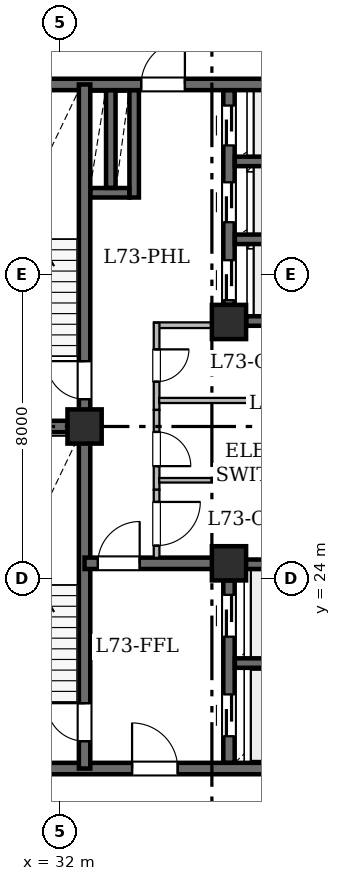
"""IFC4 building model, lengths in metres.
Left out: names, types, materials, properties, quantities, classifications, styles, units other than length and angle.
Written with IfcOpenShell. Run it as: python <this file> out.ifc"""

import sys

from ifc_helpers import new_model, si_unit, direction, frame, frame_2d, origin, origin_2d, place, context, subcontext, project, spatial, rectangle, hollow_rectangle, extrude, element, fill, save


model = new_model("IFC4")
c1 = context("Model", 3, precision=1e-05, world=origin(), true_north=direction((0.0, 1.0)))
c2 = subcontext(c1, "Body", "Model", "MODEL_VIEW")
j1 = project(units=[si_unit("LENGTHUNIT", "METRE"), si_unit("PLANEANGLEUNIT", "RADIAN")], contexts=[c1])
p1 = place(None, origin())
s1 = spatial("IfcSite", under=j1, at=p1, CompositionType="ELEMENT")
p2 = place(p1, origin())
s2 = spatial("IfcBuilding", under=s1, at=p2, CompositionType="ELEMENT")
p3 = place(p2, frame((0.0, 0.0, 286.25)))
s3 = spatial("IfcBuildingStorey", under=s2, at=p3, CompositionType="ELEMENT", Elevation=286.25)
for number, where, z_axis, x_axis in (
    (1, (32.65, 28.0, 0.0), (0.0, 0.0, 1.0), (1.0, 0.0, 0.0)),
    (2, (36.45, 24.4, 0.0), (0.0, 0.0, 1.0), (1.0, 0.0, 0.0)),
    (3, (36.45, 30.75, 0.0), (0.0, 0.0, 1.0), (1.0, 0.0, 0.0)),
):
    element("IfcColumn", number, at=place(p3, frame(where, z_axis=z_axis, x_axis=x_axis)), inside=s3, PredefinedType="COLUMN", context=c2, shape_type="SweptSolid", body=[
        extrude(hollow_rectangle(XDim=0.9, YDim=0.9, WallThickness=0.045, at=origin_2d()), origin(), (0.0, 0.0, 1.0), 4.2),
    ])
p4 = place(p3, frame((29.0, 19.0, 0.0), z_axis=(0.0, 0.0, 1.0), x_axis=(1.0, 0.0, 0.0)))
e4 = element("IfcWall", 4, at=p4, inside=s3, PredefinedType="SHEAR", context=c2, shape_type="SweptSolid", body=[
    extrude(rectangle(XDim=10.4, YDim=0.3, at=frame_2d((5.2, 0.0))), origin(), (0.0, 0.0, 1.0), 3.95),
])
p5 = place(p4, frame((4.9, 0.0, 0.0)))
e5 = element("IfcOpeningElement", 5, at=p5, cuts=e4, PredefinedType="OPENING", context=c2, shape_type="SweptSolid", body=[
    extrude(rectangle(XDim=1.2, YDim=2.15, at=frame_2d((0.6, 1.075))), frame((0.0, 0.16, 0.0), z_axis=(0.0, -1.0, 0.0), x_axis=(1.0, 0.0, 0.0)), (0.0, 0.0, 1.0), 0.32),
])
p6 = place(p3, frame((29.0, 37.0, 0.0), z_axis=(0.0, 0.0, 1.0), x_axis=(1.0, 0.0, 0.0)))
e6 = element("IfcWall", 6, at=p6, inside=s3, PredefinedType="SHEAR", context=c2, shape_type="SweptSolid", body=[
    extrude(rectangle(XDim=10.4, YDim=0.3, at=frame_2d((5.2, 0.0))), origin(), (0.0, 0.0, 1.0), 3.95),
])
p7 = place(p6, frame((5.14, 0.0, 0.0)))
e7 = element("IfcOpeningElement", 7, at=p7, cuts=e6, PredefinedType="OPENING", context=c2, shape_type="SweptSolid", body=[
    extrude(rectangle(XDim=1.15, YDim=2.2, at=frame_2d((0.575, 1.1))), frame((0.0, 0.16, 0.0), z_axis=(0.0, -1.0, 0.0), x_axis=(1.0, 0.0, 0.0)), (0.0, 0.0, 1.0), 0.32),
])
p8 = place(p3, frame((32.65, 19.0, 0.0), z_axis=(0.0, 0.0, 1.0), x_axis=(0.0, 1.0, 0.0)))
e8 = element("IfcWall", 8, at=p8, inside=s3, PredefinedType="SHEAR", context=c2, shape_type="SweptSolid", body=[
    extrude(rectangle(XDim=9.0, YDim=0.3, at=frame_2d((4.5, 0.0))), origin(), (0.0, 0.0, 1.0), 3.95),
])
p9 = place(p8, frame((0.72, 0.0, 0.0)))
e9 = element("IfcOpeningElement", 9, at=p9, cuts=e8, PredefinedType="OPENING", context=c2, shape_type="SweptSolid", body=[
    extrude(rectangle(XDim=1.0, YDim=2.15, at=frame_2d((0.5, 1.075))), frame((0.0, 0.16, 0.0), z_axis=(0.0, -1.0, 0.0), x_axis=(1.0, 0.0, 0.0)), (0.0, 0.0, 1.0), 0.32),
])
p10 = place(p3, frame((32.65, 28.0, 0.0), z_axis=(0.0, 0.0, 1.0), x_axis=(0.0, 1.0, 0.0)))
e10 = element("IfcWall", 10, at=p10, inside=s3, PredefinedType="SHEAR", context=c2, shape_type="SweptSolid", body=[
    extrude(rectangle(XDim=9.0, YDim=0.3, at=frame_2d((4.5, 0.0))), origin(), (0.0, 0.0, 1.0), 3.95),
])
p11 = place(p10, frame((0.72, 0.0, 0.0)))
e11 = element("IfcOpeningElement", 11, at=p11, cuts=e10, PredefinedType="OPENING", context=c2, shape_type="SweptSolid", body=[
    extrude(rectangle(XDim=1.0, YDim=2.15, at=frame_2d((0.5, 1.075))), frame((0.0, 0.16, 0.0), z_axis=(0.0, -1.0, 0.0), x_axis=(1.0, 0.0, 0.0)), (0.0, 0.0, 1.0), 0.32),
])
p12 = place(p3, frame((29.0, 28.0, 0.0), z_axis=(0.0, 0.0, 1.0), x_axis=(1.0, 0.0, 0.0)))
e12 = element("IfcWall", 12, at=p12, inside=s3, PredefinedType="SHEAR", context=c2, shape_type="SweptSolid", body=[
    extrude(rectangle(XDim=3.65, YDim=0.3, at=frame_2d((1.825, 0.0))), origin(), (0.0, 0.0, 1.0), 3.95),
])
p13 = place(p3, frame((32.65, 24.4, 0.0), z_axis=(0.0, 0.0, 1.0), x_axis=(1.0, 0.0, 0.0)))
e13 = element("IfcWall", 13, at=p13, inside=s3, PredefinedType="SHEAR", context=c2, shape_type="SweptSolid", body=[
    extrude(rectangle(XDim=3.8, YDim=0.3, at=frame_2d((1.9, 0.0))), origin(), (0.0, 0.0, 1.0), 3.95),
])
p14 = place(p13, frame((0.35, 0.0, 0.0)))
e14 = element("IfcOpeningElement", 14, at=p14, cuts=e13, PredefinedType="OPENING", context=c2, shape_type="SweptSolid", body=[
    extrude(rectangle(XDim=1.1, YDim=2.15, at=frame_2d((0.55, 1.075))), frame((0.0, 0.16, 0.0), z_axis=(0.0, -1.0, 0.0), x_axis=(1.0, 0.0, 0.0)), (0.0, 0.0, 1.0), 0.32),
])
p15 = place(p3, frame((36.45, 19.154, 0.0), z_axis=(0.0, 0.0, 1.0), x_axis=(0.0, 1.0, 0.0)))
e15 = element("IfcWall", 15, at=p15, inside=s3, PredefinedType="SHEAR", context=c2, shape_type="SweptSolid", body=[
    extrude(rectangle(XDim=4.796, YDim=0.3, at=frame_2d((2.398, 0.0))), origin(), (0.0, 0.0, 1.0), 3.95),
])
p16 = place(p15, frame((0.696, 0.0, 0.0)))
e16 = element("IfcOpeningElement", 16, at=p16, cuts=e15, PredefinedType="OPENING", context=c2, shape_type="SweptSolid", body=[
    extrude(rectangle(XDim=1.1, YDim=2.15, at=frame_2d((0.55, 1.075))), frame((0.0, 0.16, 0.0), z_axis=(0.0, -1.0, 0.0), x_axis=(1.0, 0.0, 0.0)), (0.0, 0.0, 1.0), 0.32),
])
p17 = place(p15, frame((3.316, 0.0, 0.0)))
e17 = element("IfcOpeningElement", 17, at=p17, cuts=e15, PredefinedType="OPENING", context=c2, shape_type="SweptSolid", body=[
    extrude(rectangle(XDim=1.1, YDim=2.15, at=frame_2d((0.55, 1.075))), frame((0.0, 0.16, 0.0), z_axis=(0.0, -1.0, 0.0), x_axis=(1.0, 0.0, 0.0)), (0.0, 0.0, 1.0), 0.32),
])
p18 = place(p3, frame((36.45, 31.2, 0.0), z_axis=(0.0, 0.0, 1.0), x_axis=(0.0, 1.0, 0.0)))
e18 = element("IfcWall", 18, at=p18, inside=s3, PredefinedType="SHEAR", context=c2, shape_type="SweptSolid", body=[
    extrude(rectangle(XDim=5.646, YDim=0.3, at=frame_2d((2.823, 0.0))), origin(), (0.0, 0.0, 1.0), 3.95),
])
p19 = place(p18, frame((0.125, 0.0, 0.0)))
e19 = element("IfcOpeningElement", 19, at=p19, cuts=e18, PredefinedType="OPENING", context=c2, shape_type="SweptSolid", body=[
    extrude(rectangle(XDim=1.05, YDim=2.15, at=frame_2d((0.525, 1.075))), frame((0.0, 0.16, 0.0), z_axis=(0.0, -1.0, 0.0), x_axis=(1.0, 0.0, 0.0)), (0.0, 0.0, 1.0), 0.32),
])
p20 = place(p18, frame((2.175, 0.0, 0.0)))
e20 = element("IfcOpeningElement", 20, at=p20, cuts=e18, PredefinedType="OPENING", context=c2, shape_type="SweptSolid", body=[
    extrude(rectangle(XDim=1.05, YDim=2.15, at=frame_2d((0.525, 1.075))), frame((0.0, 0.16, 0.0), z_axis=(0.0, -1.0, 0.0), x_axis=(1.0, 0.0, 0.0)), (0.0, 0.0, 1.0), 0.32),
])
p21 = place(p18, frame((4.195, 0.0, 0.0)))
e21 = element("IfcOpeningElement", 21, at=p21, cuts=e18, PredefinedType="OPENING", context=c2, shape_type="SweptSolid", body=[
    extrude(rectangle(XDim=1.05, YDim=2.15, at=frame_2d((0.525, 1.075))), frame((0.0, 0.16, 0.0), z_axis=(0.0, -1.0, 0.0), x_axis=(1.0, 0.0, 0.0)), (0.0, 0.0, 1.0), 0.32),
])
for number, where, z_axis, x_axis in (
    (22, (36.604, 21.775, 0.0), (0.0, 0.0, 1.0), (1.0, 0.0, 0.0)),
    (23, (36.604, 24.375, 0.0), (0.0, 0.0, 1.0), (1.0, 0.0, 0.0)),
):
    element("IfcWall", number, at=place(p3, frame(where, z_axis=z_axis, x_axis=x_axis)), inside=s3, PredefinedType="SHEAR", context=c2, shape_type="SweptSolid", body=[
        extrude(rectangle(XDim=2.642, YDim=0.25, at=frame_2d((1.321, 0.0))), origin(), (0.0, 0.0, 1.0), 3.95),
    ])
p22 = place(p3, frame((36.904, 30.775, 0.0), z_axis=(0.0, 0.0, 1.0), x_axis=(1.0, 0.0, 0.0)))
e24 = element("IfcWall", 24, at=p22, inside=s3, PredefinedType="SHEAR", context=c2, shape_type="SweptSolid", body=[
    extrude(rectangle(XDim=2.342, YDim=0.25, at=frame_2d((1.171, 0.0))), origin(), (0.0, 0.0, 1.0), 3.95),
])
for number, where, z_axis, x_axis in (
    (25, (36.604, 32.925, 0.0), (0.0, 0.0, 1.0), (1.0, 0.0, 0.0)),
    (26, (36.604, 34.975, 0.0), (0.0, 0.0, 1.0), (1.0, 0.0, 0.0)),
):
    element("IfcWall", number, at=place(p3, frame(where, z_axis=z_axis, x_axis=x_axis)), inside=s3, PredefinedType="SHEAR", context=c2, shape_type="SweptSolid", body=[
        extrude(rectangle(XDim=2.642, YDim=0.25, at=frame_2d((1.321, 0.0))), origin(), (0.0, 0.0, 1.0), 3.95),
    ])
p23 = place(p3, frame((33.955, 34.025, 0.0), z_axis=(0.0, 0.0, 1.0), x_axis=(0.0, 1.0, 0.0)))
e27 = element("IfcWall", 27, at=p23, inside=s3, PredefinedType="SHEAR", context=c2, shape_type="SweptSolid", body=[
    extrude(rectangle(XDim=2.821, YDim=0.25, at=frame_2d((1.411, 0.0))), origin(), (0.0, 0.0, 1.0), 3.95),
])
p24 = place(p3, frame((32.804, 34.15, 0.0), z_axis=(0.0, 0.0, 1.0), x_axis=(1.0, 0.0, 0.0)))
e28 = element("IfcWall", 28, at=p24, inside=s3, PredefinedType="SHEAR", context=c2, shape_type="SweptSolid", body=[
    extrude(rectangle(XDim=1.022, YDim=0.25, at=frame_2d((0.511, 0.0))), origin(), (0.0, 0.0, 1.0), 3.95),
])
p25 = place(p3, frame((33.34, 34.279, 0.0), z_axis=(0.0, 0.0, 1.0), x_axis=(0.0, 1.0, 0.0)))
e29 = element("IfcWall", 29, at=p25, inside=s3, PredefinedType="SHEAR", context=c2, shape_type="SweptSolid", body=[
    extrude(rectangle(XDim=2.567, YDim=0.25, at=frame_2d((1.283, 0.0))), origin(), (0.0, 0.0, 1.0), 3.95),
])
p26 = place(p3, frame((36.3, 30.665, 0.0), z_axis=(0.0, 0.0, 1.0), x_axis=(-1.0, 0.0, 0.0)))
e30 = element("IfcWall", 30, at=p26, inside=s3, PredefinedType="STANDARD", context=c2, shape_type="SweptSolid", body=[
    extrude(rectangle(XDim=1.82, YDim=0.15, at=frame_2d((0.91, 0.0))), origin(), (0.0, 0.0, 1.0), 3.95),
])
p27 = place(p3, frame((34.545, 30.73, 0.0), z_axis=(0.0, 0.0, 1.0), x_axis=(0.0, -1.0, 0.0)))
e31 = element("IfcWall", 31, at=p27, inside=s3, PredefinedType="STANDARD", context=c2, shape_type="SweptSolid", body=[
    extrude(rectangle(XDim=2.294, YDim=0.15, at=frame_2d((1.147, 0.0))), origin(), (0.0, 0.0, 1.0), 3.95),
])
p28 = place(p27, frame((0.701, 0.0, 0.0)))
e32 = element("IfcOpeningElement", 32, at=p28, cuts=e31, PredefinedType="OPENING", context=c2, shape_type="SweptSolid", body=[
    extrude(rectangle(XDim=0.85, YDim=2.1, at=frame_2d((0.425, 1.05))), frame((0.0, 0.085, 0.0), z_axis=(0.0, -1.0, 0.0), x_axis=(1.0, 0.0, 0.0)), (0.0, 0.0, 1.0), 0.17),
])
p29 = place(p3, frame((34.545, 28.436, 0.0), z_axis=(0.0, 0.0, 1.0), x_axis=(0.0, -1.0, 0.0)))
e33 = element("IfcWall", 33, at=p29, inside=s3, PredefinedType="STANDARD", context=c2, shape_type="SweptSolid", body=[
    extrude(rectangle(XDim=2.1, YDim=0.15, at=frame_2d((1.05, 0.0))), origin(), (0.0, 0.0, 1.0), 3.95),
])
p30 = place(p29, frame((0.579, 0.0, 0.0)))
e34 = element("IfcOpeningElement", 34, at=p30, cuts=e33, PredefinedType="OPENING", context=c2, shape_type="SweptSolid", body=[
    extrude(rectangle(XDim=0.9, YDim=2.1, at=frame_2d((0.45, 1.05))), frame((0.0, 0.085, 0.0), z_axis=(0.0, -1.0, 0.0), x_axis=(1.0, 0.0, 0.0)), (0.0, 0.0, 1.0), 0.17),
])
p31 = place(p3, frame((34.545, 26.336, 0.0), z_axis=(0.0, 0.0, 1.0), x_axis=(0.0, -1.0, 0.0)))
e35 = element("IfcWall", 35, at=p31, inside=s3, PredefinedType="STANDARD", context=c2, shape_type="SweptSolid", body=[
    extrude(rectangle(XDim=1.792, YDim=0.15, at=frame_2d((0.896, 0.0))), origin(), (0.0, 0.0, 1.0), 3.95),
])
p32 = place(p31, frame((0.321, 0.0, 0.0)))
e36 = element("IfcOpeningElement", 36, at=p32, cuts=e35, PredefinedType="OPENING", context=c2, shape_type="SweptSolid", body=[
    extrude(rectangle(XDim=1.15, YDim=2.2, at=frame_2d((0.575, 1.1))), frame((0.0, 0.085, 0.0), z_axis=(0.0, -1.0, 0.0), x_axis=(1.0, 0.0, 0.0)), (0.0, 0.0, 1.0), 0.17),
])
p33 = place(p3, frame((39.256, 28.685, 0.0), z_axis=(0.0, 0.0, 1.0), x_axis=(-1.0, 0.0, 0.0)))
e37 = element("IfcWall", 37, at=p33, inside=s3, PredefinedType="PARTITIONING", context=c2, shape_type="SweptSolid", body=[
    extrude(rectangle(XDim=4.644, YDim=0.135, at=frame_2d((2.322, 0.0))), origin(), (0.0, 0.0, 1.0), 3.95),
])
p34 = place(p3, frame((39.256, 26.585, 0.0), z_axis=(0.0, 0.0, 1.0), x_axis=(-1.0, 0.0, 0.0)))
e38 = element("IfcWall", 38, at=p34, inside=s3, PredefinedType="PARTITIONING", context=c2, shape_type="SweptSolid", body=[
    extrude(rectangle(XDim=4.644, YDim=0.12, at=frame_2d((2.322, 0.0))), origin(), (0.0, 0.0, 1.0), 3.95),
])
p35 = place(p9, origin())
e39 = element("IfcDoor", 39, at=p35, inside=s3, OperationType="SINGLE_SWING_RIGHT", PredefinedType="DOOR", context=c2, shape_type="SweptSolid", body=[
    extrude(rectangle(XDim=1.0, YDim=2.15, at=frame_2d((0.5, 1.075))), frame((0.0, 0.025, 0.0), z_axis=(0.0, -1.0, 0.0), x_axis=(1.0, 0.0, 0.0)), (0.0, 0.0, 1.0), 0.05),
])
fill(e9, e39)
p36 = place(p11, origin())
e40 = element("IfcDoor", 40, at=p36, inside=s3, OperationType="SINGLE_SWING_RIGHT", PredefinedType="DOOR", context=c2, shape_type="SweptSolid", body=[
    extrude(rectangle(XDim=1.0, YDim=2.15, at=frame_2d((0.5, 1.075))), frame((0.0, 0.025, 0.0), z_axis=(0.0, -1.0, 0.0), x_axis=(1.0, 0.0, 0.0)), (0.0, 0.0, 1.0), 0.05),
])
fill(e11, e40)
p37 = place(p14, origin())
e41 = element("IfcDoor", 41, at=p37, inside=s3, OperationType="SINGLE_SWING_RIGHT", PredefinedType="DOOR", context=c2, shape_type="SweptSolid", body=[
    extrude(rectangle(XDim=1.1, YDim=2.15, at=frame_2d((0.55, 1.075))), frame((0.0, 0.025, 0.0), z_axis=(0.0, -1.0, 0.0), x_axis=(1.0, 0.0, 0.0)), (0.0, 0.0, 1.0), 0.05),
])
fill(e14, e41)
p38 = place(p5, origin())
e42 = element("IfcDoor", 42, at=p38, inside=s3, OperationType="SINGLE_SWING_LEFT", PredefinedType="DOOR", context=c2, shape_type="SweptSolid", body=[
    extrude(rectangle(XDim=1.2, YDim=2.15, at=frame_2d((0.6, 1.075))), frame((0.0, 0.025, 0.0), z_axis=(0.0, -1.0, 0.0), x_axis=(1.0, 0.0, 0.0)), (0.0, 0.0, 1.0), 0.05),
])
fill(e5, e42)
p39 = place(p7, origin())
e43 = element("IfcDoor", 43, at=p39, inside=s3, OperationType="SINGLE_SWING_RIGHT", PredefinedType="DOOR", context=c2, shape_type="SweptSolid", body=[
    extrude(rectangle(XDim=1.15, YDim=2.2, at=frame_2d((0.575, 1.1))), frame((0.0, 0.025, 0.0), z_axis=(0.0, -1.0, 0.0), x_axis=(1.0, 0.0, 0.0)), (0.0, 0.0, 1.0), 0.05),
])
fill(e7, e43)
p40 = place(p16, origin())
e44 = element("IfcDoor", 44, at=p40, inside=s3, OperationType="SLIDING_TO_LEFT", PredefinedType="DOOR", context=c2, shape_type="SweptSolid", body=[
    extrude(rectangle(XDim=1.1, YDim=2.15, at=frame_2d((0.55, 1.075))), frame((0.0, 0.025, 0.0), z_axis=(0.0, -1.0, 0.0), x_axis=(1.0, 0.0, 0.0)), (0.0, 0.0, 1.0), 0.05),
])
fill(e16, e44)
p41 = place(p17, origin())
e45 = element("IfcDoor", 45, at=p41, inside=s3, OperationType="SLIDING_TO_LEFT", PredefinedType="DOOR", context=c2, shape_type="SweptSolid", body=[
    extrude(rectangle(XDim=1.1, YDim=2.15, at=frame_2d((0.55, 1.075))), frame((0.0, 0.025, 0.0), z_axis=(0.0, -1.0, 0.0), x_axis=(1.0, 0.0, 0.0)), (0.0, 0.0, 1.0), 0.05),
])
fill(e17, e45)
p42 = place(p19, origin())
e46 = element("IfcDoor", 46, at=p42, inside=s3, OperationType="SLIDING_TO_LEFT", PredefinedType="DOOR", context=c2, shape_type="SweptSolid", body=[
    extrude(rectangle(XDim=1.05, YDim=2.15, at=frame_2d((0.525, 1.075))), frame((0.0, 0.025, 0.0), z_axis=(0.0, -1.0, 0.0), x_axis=(1.0, 0.0, 0.0)), (0.0, 0.0, 1.0), 0.05),
])
fill(e19, e46)
p43 = place(p20, origin())
e47 = element("IfcDoor", 47, at=p43, inside=s3, OperationType="SLIDING_TO_LEFT", PredefinedType="DOOR", context=c2, shape_type="SweptSolid", body=[
    extrude(rectangle(XDim=1.05, YDim=2.15, at=frame_2d((0.525, 1.075))), frame((0.0, 0.025, 0.0), z_axis=(0.0, -1.0, 0.0), x_axis=(1.0, 0.0, 0.0)), (0.0, 0.0, 1.0), 0.05),
])
fill(e20, e47)
p44 = place(p21, origin())
e48 = element("IfcDoor", 48, at=p44, inside=s3, OperationType="SLIDING_TO_LEFT", PredefinedType="DOOR", context=c2, shape_type="SweptSolid", body=[
    extrude(rectangle(XDim=1.05, YDim=2.15, at=frame_2d((0.525, 1.075))), frame((0.0, 0.025, 0.0), z_axis=(0.0, -1.0, 0.0), x_axis=(1.0, 0.0, 0.0)), (0.0, 0.0, 1.0), 0.05),
])
fill(e21, e48)
p45 = place(p28, origin())
e49 = element("IfcDoor", 49, at=p45, inside=s3, OperationType="SINGLE_SWING_LEFT", PredefinedType="DOOR", context=c2, shape_type="SweptSolid", body=[
    extrude(rectangle(XDim=0.85, YDim=2.1, at=frame_2d((0.425, 1.05))), frame((0.0, 0.025, 0.0), z_axis=(0.0, -1.0, 0.0), x_axis=(1.0, 0.0, 0.0)), (0.0, 0.0, 1.0), 0.05),
])
fill(e32, e49)
p46 = place(p30, origin())
e50 = element("IfcDoor", 50, at=p46, inside=s3, OperationType="SINGLE_SWING_RIGHT", PredefinedType="DOOR", context=c2, shape_type="SweptSolid", body=[
    extrude(rectangle(XDim=0.9, YDim=2.1, at=frame_2d((0.45, 1.05))), frame((0.0, 0.025, 0.0), z_axis=(0.0, -1.0, 0.0), x_axis=(1.0, 0.0, 0.0)), (0.0, 0.0, 1.0), 0.05),
])
fill(e34, e50)
p47 = place(p32, origin())
e51 = element("IfcDoor", 51, at=p47, inside=s3, OperationType="SINGLE_SWING_LEFT", PredefinedType="DOOR", context=c2, shape_type="SweptSolid", body=[
    extrude(rectangle(XDim=1.15, YDim=2.2, at=frame_2d((0.575, 1.1))), frame((0.0, 0.025, 0.0), z_axis=(0.0, -1.0, 0.0), x_axis=(1.0, 0.0, 0.0)), (0.0, 0.0, 1.0), 0.05),
])
fill(e36, e51)
save(model, sys.argv[1])
